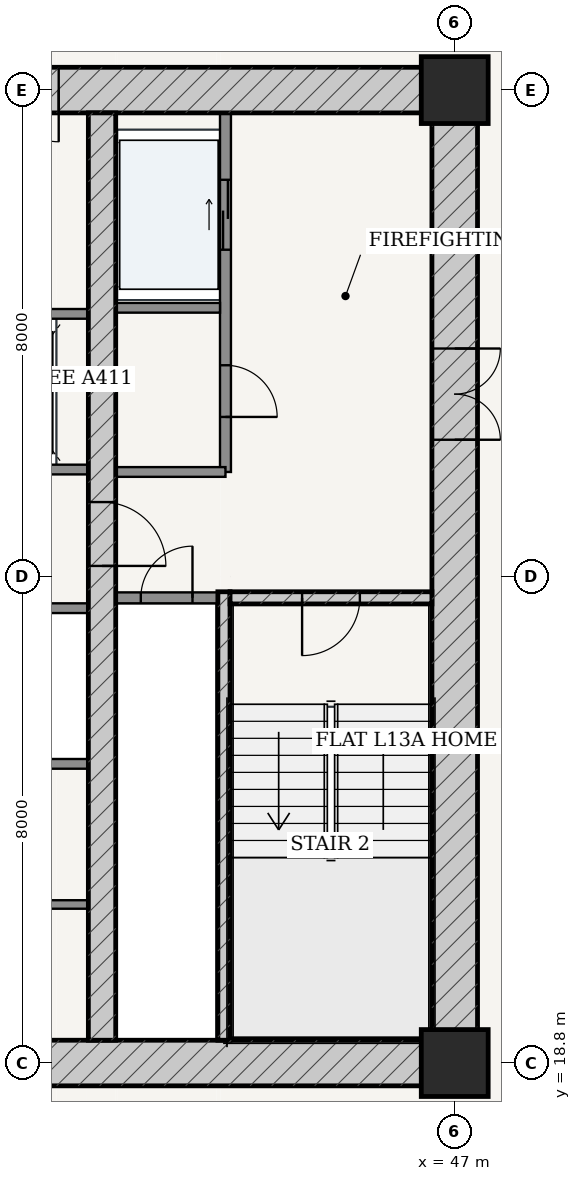
"""IFC4 building model, lengths in metres.
Left out: names, types, materials, properties, quantities, classifications, styles, units other than length and angle.
Written with IfcOpenShell. Run it as: python <this file> out.ifc"""

import sys

from ifc_helpers import new_model, si_unit, direction, frame, frame_2d, origin, origin_2d, place, context, subcontext, project, spatial, rectangle, extrude, source, transform, mapped, element, fill, save


model = new_model("IFC4")
c1 = context("Model", 3, precision=1e-05, world=origin(), true_north=direction((-0.2419218956, 0.970295726276)))
c2 = subcontext(c1, "Body", "Model", "MODEL_VIEW")
j1 = project(units=[si_unit("LENGTHUNIT", "METRE"), si_unit("PLANEANGLEUNIT", "RADIAN")], contexts=[c1])
p1 = place(None, origin())
s1 = spatial("IfcSite", under=j1, at=p1, CompositionType="ELEMENT")
p2 = place(p1, origin())
s2 = spatial("IfcBuilding", under=s1, at=p2, CompositionType="ELEMENT")
p3 = place(p2, frame((0.0, 0.0, 52.8)))
s3 = spatial("IfcBuildingStorey", under=s2, at=p3, CompositionType="ELEMENT", Elevation=52.8)
for number, where, z_axis, x_axis in (
    (1, (47.0, 18.8, 0.0), (0.0, 0.0, 1.0), (1.0, 0.0, 0.0)),
    (2, (47.0, 34.8, 0.0), (0.0, 0.0, 1.0), (1.0, 0.0, 0.0)),
):
    element("IfcColumn", number, at=place(p3, frame(where, z_axis=z_axis, x_axis=x_axis)), inside=s3, PredefinedType="COLUMN", context=c2, shape_type="SweptSolid", body=[
        extrude(rectangle(XDim=1.1, YDim=1.1, at=origin_2d()), origin(), (0.0, 0.0, 1.0), 3.6),
    ])
p4 = place(p3, frame((28.625, 18.8, 0.0), z_axis=(0.0, 0.0, 1.0), x_axis=(1.0, 0.0, 0.0)))
e3 = element("IfcWall", 3, at=p4, inside=s3, PredefinedType="SHEAR", context=c2, shape_type="SweptSolid", body=[
    extrude(rectangle(XDim=18.75, YDim=0.75, at=frame_2d((9.375, 0.0))), origin(), (0.0, 0.0, 1.0), 3.32),
])
p5 = place(p4, frame((7.627, 0.0, 0.0)))
e4 = element("IfcOpeningElement", 4, at=p5, cuts=e3, PredefinedType="OPENING", context=c2, shape_type="SweptSolid", body=[
    extrude(rectangle(XDim=0.85, YDim=2.1, at=frame_2d((0.425, 1.05))), frame((0.0, 0.385, 0.0), z_axis=(0.0, -1.0, 0.0), x_axis=(1.0, 0.0, 0.0)), (0.0, 0.0, 1.0), 0.77),
])
p6 = place(p4, frame((10.673, 0.0, 0.0)))
e5 = element("IfcOpeningElement", 5, at=p6, cuts=e3, PredefinedType="OPENING", context=c2, shape_type="SweptSolid", body=[
    extrude(rectangle(XDim=0.85, YDim=2.1, at=frame_2d((0.425, 1.05))), frame((0.0, 0.385, 0.0), z_axis=(0.0, -1.0, 0.0), x_axis=(1.0, 0.0, 0.0)), (0.0, 0.0, 1.0), 0.77),
])
p7 = place(p3, frame((28.625, 34.8, 0.0), z_axis=(0.0, 0.0, 1.0), x_axis=(1.0, 0.0, 0.0)))
e6 = element("IfcWall", 6, at=p7, inside=s3, PredefinedType="SHEAR", context=c2, shape_type="SweptSolid", body=[
    extrude(rectangle(XDim=18.75, YDim=0.75, at=frame_2d((9.375, 0.0))), origin(), (0.0, 0.0, 1.0), 3.32),
])
p8 = place(p7, frame((6.887, 0.0, 0.0)))
e7 = element("IfcOpeningElement", 7, at=p8, cuts=e6, PredefinedType="OPENING", context=c2, shape_type="SweptSolid", body=[
    extrude(rectangle(XDim=0.85, YDim=2.1, at=frame_2d((0.425, 1.05))), frame((0.0, 0.385, 0.0), z_axis=(0.0, -1.0, 0.0), x_axis=(1.0, 0.0, 0.0)), (0.0, 0.0, 1.0), 0.77),
])
p9 = place(p7, frame((8.945, 0.0, 0.0)))
e8 = element("IfcOpeningElement", 8, at=p9, cuts=e6, PredefinedType="OPENING", context=c2, shape_type="SweptSolid", body=[
    extrude(rectangle(XDim=0.86, YDim=2.1, at=frame_2d((0.43, 1.05))), frame((0.0, 0.385, 0.0), z_axis=(0.0, -1.0, 0.0), x_axis=(1.0, 0.0, 0.0)), (0.0, 0.0, 1.0), 0.77),
])
p10 = place(p7, frame((11.012, 0.0, 0.0)))
e9 = element("IfcOpeningElement", 9, at=p10, cuts=e6, PredefinedType="OPENING", context=c2, shape_type="SweptSolid", body=[
    extrude(rectangle(XDim=0.85, YDim=2.1, at=frame_2d((0.425, 1.05))), frame((0.0, 0.385, 0.0), z_axis=(0.0, -1.0, 0.0), x_axis=(1.0, 0.0, 0.0)), (0.0, 0.0, 1.0), 0.77),
])
p11 = place(p3, frame((47.0, 19.175, 0.0), z_axis=(0.0, 0.0, 1.0), x_axis=(0.0, 1.0, 0.0)))
e10 = element("IfcWall", 10, at=p11, inside=s3, PredefinedType="SHEAR", context=c2, shape_type="SweptSolid", body=[
    extrude(rectangle(XDim=15.25, YDim=0.75, at=frame_2d((7.625, 0.0))), origin(), (0.0, 0.0, 1.0), 3.32),
])
p12 = place(p11, frame((9.875, 0.0, 0.0)))
e11 = element("IfcOpeningElement", 11, at=p12, cuts=e10, PredefinedType="OPENING", context=c2, shape_type="SweptSolid", body=[
    extrude(rectangle(XDim=1.5, YDim=2.2, at=frame_2d((0.75, 1.1))), frame((0.0, 0.385, 0.0), z_axis=(0.0, -1.0, 0.0), x_axis=(1.0, 0.0, 0.0)), (0.0, 0.0, 1.0), 0.77),
])
p13 = place(p3, frame((43.205, 19.175, 0.0), z_axis=(0.0, 0.0, 1.0), x_axis=(0.0, 1.0, 0.0)))
e12 = element("IfcWall", 12, at=p13, inside=s3, PredefinedType="SOLIDWALL", context=c2, shape_type="SweptSolid", body=[
    extrude(rectangle(XDim=7.375, YDim=0.2, at=frame_2d((3.688, 0.0))), origin(), (0.0, 0.0, 1.0), 3.32),
])
p14 = place(p3, frame((43.305, 26.45, 0.0), z_axis=(0.0, 0.0, 1.0), x_axis=(1.0, 0.0, 0.0)))
e13 = element("IfcWall", 13, at=p14, inside=s3, PredefinedType="SOLIDWALL", context=c2, shape_type="SweptSolid", body=[
    extrude(rectangle(XDim=3.32, YDim=0.2, at=frame_2d((1.66, 0.0))), origin(), (0.0, 0.0, 1.0), 3.32),
])
p15 = place(p14, frame((1.185, 0.0, 0.0)))
e14 = element("IfcOpeningElement", 14, at=p15, cuts=e13, PredefinedType="OPENING", context=c2, shape_type="SweptSolid", body=[
    extrude(rectangle(XDim=0.95, YDim=2.15, at=frame_2d((0.475, 1.075))), frame((0.0, 0.11, 0.0), z_axis=(0.0, -1.0, 0.0), x_axis=(1.0, 0.0, 0.0)), (0.0, 0.0, 1.0), 0.22),
])
p16 = place(p3, frame((41.2, 19.175, 0.0), z_axis=(0.0, 0.0, 1.0), x_axis=(0.0, 1.0, 0.0)))
e15 = element("IfcWall", 15, at=p16, inside=s3, PredefinedType="SHEAR", context=c2, shape_type="SweptSolid", body=[
    extrude(rectangle(XDim=15.25, YDim=0.45, at=frame_2d((7.625, 0.0))), origin(), (0.0, 0.0, 1.0), 3.32),
])
p17 = place(p16, frame((7.8, 0.0, 0.0)))
e16 = element("IfcOpeningElement", 16, at=p17, cuts=e15, PredefinedType="OPENING", context=c2, shape_type="SweptSolid", body=[
    extrude(rectangle(XDim=1.05, YDim=2.15, at=frame_2d((0.525, 1.075))), frame((0.0, 0.235, 0.0), z_axis=(0.0, -1.0, 0.0), x_axis=(1.0, 0.0, 0.0)), (0.0, 0.0, 1.0), 0.47),
])
p18 = place(p3, frame((41.425, 26.45, 0.0), z_axis=(0.0, 0.0, 1.0), x_axis=(1.0, 0.0, 0.0)))
e17 = element("IfcWall", 17, at=p18, inside=s3, PredefinedType="PARTITIONING", context=c2, shape_type="SweptSolid", body=[
    extrude(rectangle(XDim=1.675, YDim=0.18, at=frame_2d((0.837, 0.0))), origin(), (0.0, 0.0, 1.0), 3.32),
])
p19 = place(p18, frame((0.413, 0.0, 0.0)))
e18 = element("IfcOpeningElement", 18, at=p19, cuts=e17, PredefinedType="OPENING", context=c2, shape_type="SweptSolid", body=[
    extrude(rectangle(XDim=0.85, YDim=2.1, at=frame_2d((0.425, 1.05))), frame((0.0, 0.1, 0.0), z_axis=(0.0, -1.0, 0.0), x_axis=(1.0, 0.0, 0.0)), (0.0, 0.0, 1.0), 0.2),
])
p20 = place(p3, frame((43.23, 28.52, 0.0), z_axis=(0.0, 0.0, 1.0), x_axis=(0.0, 1.0, 0.0)))
e19 = element("IfcWall", 19, at=p20, inside=s3, PredefinedType="PARTITIONING", context=c2, shape_type="SweptSolid", body=[
    extrude(rectangle(XDim=5.905, YDim=0.18, at=frame_2d((2.953, 0.0))), origin(), (0.0, 0.0, 1.0), 3.32),
])
p21 = place(p20, frame((0.905, 0.0, 0.0)))
e20 = element("IfcOpeningElement", 20, at=p21, cuts=e19, PredefinedType="OPENING", context=c2, shape_type="SweptSolid", body=[
    extrude(rectangle(XDim=0.85, YDim=2.1, at=frame_2d((0.425, 1.05))), frame((0.0, 0.1, 0.0), z_axis=(0.0, -1.0, 0.0), x_axis=(1.0, 0.0, 0.0)), (0.0, 0.0, 1.0), 0.2),
])
p22 = place(p20, frame((3.655, 0.0, 0.0)))
e21 = element("IfcOpeningElement", 21, at=p22, cuts=e19, PredefinedType="OPENING", context=c2, shape_type="SweptSolid", body=[
    extrude(rectangle(XDim=1.15, YDim=2.2, at=frame_2d((0.575, 1.1))), frame((0.0, 0.1, 0.0), z_axis=(0.0, -1.0, 0.0), x_axis=(1.0, 0.0, 0.0)), (0.0, 0.0, 1.0), 0.2),
])
p23 = place(p3, frame((41.425, 31.22, 0.0), z_axis=(0.0, 0.0, 1.0), x_axis=(1.0, 0.0, 0.0)))
e22 = element("IfcWall", 22, at=p23, inside=s3, PredefinedType="PARTITIONING", context=c2, shape_type="SweptSolid", body=[
    extrude(rectangle(XDim=1.715, YDim=0.16, at=frame_2d((0.857, 0.0))), origin(), (0.0, 0.0, 1.0), 3.32),
])
p24 = place(p3, frame((41.425, 28.52, 0.0), z_axis=(0.0, 0.0, 1.0), x_axis=(1.0, 0.0, 0.0)))
e23 = element("IfcWall", 23, at=p24, inside=s3, PredefinedType="PARTITIONING", context=c2, shape_type="SweptSolid", body=[
    extrude(rectangle(XDim=1.805, YDim=0.16, at=frame_2d((0.902, 0.0))), origin(), (0.0, 0.0, 1.0), 3.32),
])
p25 = place(p3, frame((35.025, 28.56, 0.0), z_axis=(0.0, 0.0, 1.0), x_axis=(1.0, 0.0, 0.0)))
e24 = element("IfcWall", 24, at=p25, inside=s3, PredefinedType="PARTITIONING", context=c2, shape_type="SweptSolid", body=[
    extrude(rectangle(XDim=5.95, YDim=0.16, at=frame_2d((2.975, 0.0))), origin(), (0.0, 0.0, 1.0), 3.32),
])
p26 = place(p25, frame((0.76, 0.0, 0.0)))
e25 = element("IfcOpeningElement", 25, at=p26, cuts=e24, PredefinedType="OPENING", context=c2, shape_type="SweptSolid", body=[
    extrude(rectangle(XDim=1.1, YDim=2.2, at=frame_2d((0.55, 1.1))), frame((0.0, 0.09, 0.0), z_axis=(0.0, -1.0, 0.0), x_axis=(1.0, 0.0, 0.0)), (0.0, 0.0, 1.0), 0.18),
])
p27 = place(p25, frame((2.425, 0.0, 0.0)))
e26 = element("IfcOpeningElement", 26, at=p27, cuts=e24, PredefinedType="OPENING", context=c2, shape_type="SweptSolid", body=[
    extrude(rectangle(XDim=1.1, YDim=2.2, at=frame_2d((0.55, 1.1))), frame((0.0, 0.09, 0.0), z_axis=(0.0, -1.0, 0.0), x_axis=(1.0, 0.0, 0.0)), (0.0, 0.0, 1.0), 0.18),
])
p28 = place(p25, frame((4.09, 0.0, 0.0)))
e27 = element("IfcOpeningElement", 27, at=p28, cuts=e24, PredefinedType="OPENING", context=c2, shape_type="SweptSolid", body=[
    extrude(rectangle(XDim=1.1, YDim=2.2, at=frame_2d((0.55, 1.1))), frame((0.0, 0.09, 0.0), z_axis=(0.0, -1.0, 0.0), x_axis=(1.0, 0.0, 0.0)), (0.0, 0.0, 1.0), 0.18),
])
for number, where, z_axis, x_axis in (
    (28, (35.025, 31.12, 0.0), (0.0, 0.0, 1.0), (1.0, 0.0, 0.0)),
    (29, (35.025, 26.28, 0.0), (0.0, 0.0, 1.0), (1.0, 0.0, 0.0)),
    (30, (35.025, 23.72, 0.0), (0.0, 0.0, 1.0), (1.0, 0.0, 0.0)),
):
    element("IfcWall", number, at=place(p3, frame(where, z_axis=z_axis, x_axis=x_axis)), inside=s3, PredefinedType="PARTITIONING", context=c2, shape_type="SweptSolid", body=[
        extrude(rectangle(XDim=5.95, YDim=0.16, at=frame_2d((2.975, 0.0))), origin(), (0.0, 0.0, 1.0), 3.32),
    ])
p29 = place(p3, frame((38.4, 21.407, 0.0), z_axis=(0.0, 0.0, 1.0), x_axis=(1.0, 0.0, 0.0)))
e31 = element("IfcWall", 31, at=p29, inside=s3, PredefinedType="PARTITIONING", context=c2, shape_type="SweptSolid", body=[
    extrude(rectangle(XDim=2.575, YDim=0.14, at=frame_2d((1.288, 0.0))), origin(), (0.0, 0.0, 1.0), 3.32),
])
p30 = place(p29, frame((0.863, 0.0, 0.0)))
e32 = element("IfcOpeningElement", 32, at=p30, cuts=e31, PredefinedType="OPENING", context=c2, shape_type="SweptSolid", body=[
    extrude(rectangle(XDim=0.85, YDim=2.1, at=frame_2d((0.425, 1.05))), frame((0.0, 0.08, 0.0), z_axis=(0.0, -1.0, 0.0), x_axis=(1.0, 0.0, 0.0)), (0.0, 0.0, 1.0), 0.16),
])
m1 = source(origin(), c2, "Body", "SweptSolid", [
    extrude(rectangle(XDim=1.5, YDim=2.2, at=frame_2d((0.75, 1.1))), frame((0.0, 0.025, 0.0), z_axis=(0.0, -1.0, 0.0), x_axis=(1.0, 0.0, 0.0)), (0.0, 0.0, 1.0), 0.05),
])
p31 = place(p12, frame((1.5, 0.0, 0.0), z_axis=(0.0, 0.0, 1.0), x_axis=(-1.0, 0.0, 0.0)))
e33 = element("IfcDoor", 33, at=p31, inside=s3, OperationType="DOUBLE_DOOR_SINGLE_SWING", PredefinedType="DOOR", context=c2, shape_type="MappedRepresentation", body=[
    mapped(m1, transform((0.0, 0.0, 0.0), scale=1.0)),
])
fill(e11, e33)
m2 = source(origin(), c2, "Body", "SweptSolid", [
    extrude(rectangle(XDim=1.05, YDim=2.15, at=frame_2d((0.525, 1.075))), frame((0.0, 0.025, 0.0), z_axis=(0.0, -1.0, 0.0), x_axis=(1.0, 0.0, 0.0)), (0.0, 0.0, 1.0), 0.05),
])
p32 = place(p17, frame((1.05, 0.0, 0.0), z_axis=(0.0, 0.0, 1.0), x_axis=(-1.0, 0.0, 0.0)))
e34 = element("IfcDoor", 34, at=p32, inside=s3, OperationType="SINGLE_SWING_RIGHT", PredefinedType="DOOR", context=c2, shape_type="MappedRepresentation", body=[
    mapped(m2, transform((0.0, 0.0, 0.0), scale=1.0)),
])
fill(e16, e34)
m3 = source(origin(), c2, "Body", "SweptSolid", [
    extrude(rectangle(XDim=0.95, YDim=2.15, at=frame_2d((0.475, 1.075))), frame((0.0, 0.025, 0.0), z_axis=(0.0, -1.0, 0.0), x_axis=(1.0, 0.0, 0.0)), (0.0, 0.0, 1.0), 0.05),
])
p33 = place(p15, frame((0.95, 0.0, 0.0), z_axis=(0.0, 0.0, 1.0), x_axis=(-1.0, 0.0, 0.0)))
e35 = element("IfcDoor", 35, at=p33, inside=s3, OperationType="SINGLE_SWING_RIGHT", PredefinedType="DOOR", context=c2, shape_type="MappedRepresentation", body=[
    mapped(m3, transform((0.0, 0.0, 0.0), scale=1.0)),
])
fill(e14, e35)
m4 = source(origin(), c2, "Body", "SweptSolid", [
    extrude(rectangle(XDim=0.85, YDim=2.1, at=frame_2d((0.425, 1.05))), frame((0.0, 0.025, 0.0), z_axis=(0.0, -1.0, 0.0), x_axis=(1.0, 0.0, 0.0)), (0.0, 0.0, 1.0), 0.05),
])
p34 = place(p19, origin())
e36 = element("IfcDoor", 36, at=p34, inside=s3, OperationType="SINGLE_SWING_RIGHT", PredefinedType="DOOR", context=c2, shape_type="MappedRepresentation", body=[
    mapped(m4, transform((0.0, 0.0, 0.0), scale=1.0)),
])
fill(e18, e36)
p35 = place(p21, frame((0.85, 0.0, 0.0), z_axis=(0.0, 0.0, 1.0), x_axis=(-1.0, 0.0, 0.0)))
e37 = element("IfcDoor", 37, at=p35, inside=s3, OperationType="SINGLE_SWING_RIGHT", PredefinedType="DOOR", context=c2, shape_type="MappedRepresentation", body=[
    mapped(m4, transform((0.0, 0.0, 0.0), scale=1.0)),
])
fill(e20, e37)
p36 = place(p10, frame((0.85, 0.0, 0.0), z_axis=(0.0, 0.0, 1.0), x_axis=(-1.0, 0.0, 0.0)))
e38 = element("IfcDoor", 38, at=p36, inside=s3, OperationType="SINGLE_SWING_LEFT", PredefinedType="DOOR", context=c2, shape_type="MappedRepresentation", body=[
    mapped(m4, transform((0.0, 0.0, 0.0), scale=1.0)),
])
fill(e9, e38)
m5 = source(origin(), c2, "Body", "SweptSolid", [
    extrude(rectangle(XDim=1.15, YDim=2.2, at=frame_2d((0.575, 1.1))), frame((0.0, 0.025, 0.0), z_axis=(0.0, -1.0, 0.0), x_axis=(1.0, 0.0, 0.0)), (0.0, 0.0, 1.0), 0.05),
])
p37 = place(p22, origin())
e39 = element("IfcDoor", 39, at=p37, inside=s3, OperationType="DOUBLE_DOOR_SLIDING", PredefinedType="DOOR", context=c2, shape_type="MappedRepresentation", body=[
    mapped(m5, transform((0.0, 0.0, 0.0), scale=1.0)),
])
fill(e21, e39)
save(model, sys.argv[1])
